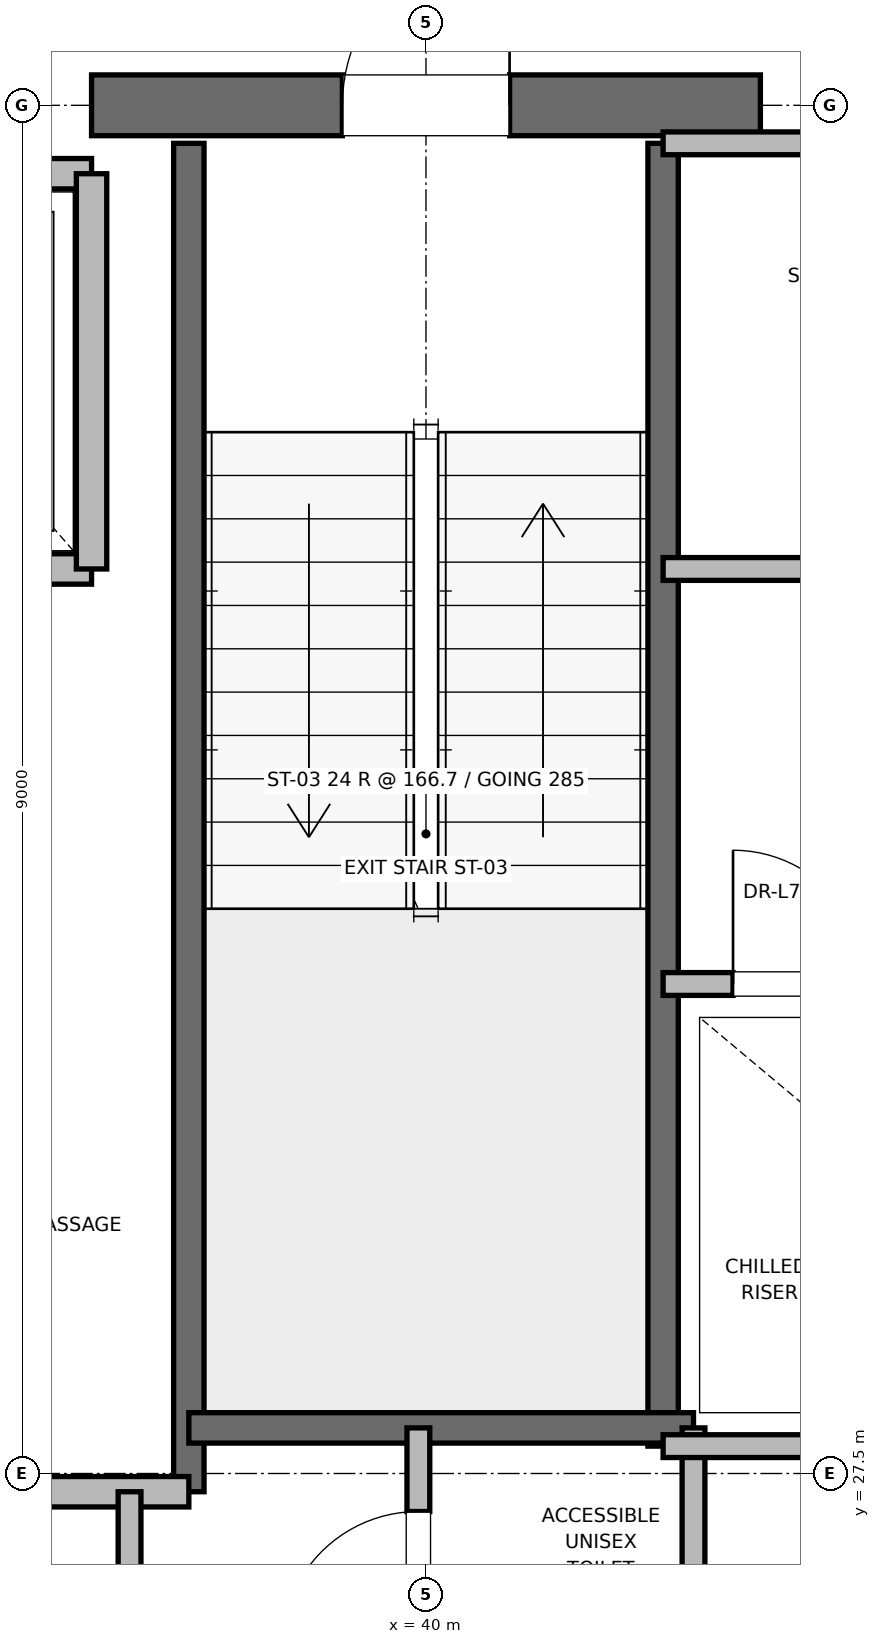
"""IFC4 building model, lengths in metres.
Left out: names, types, materials, properties, quantities, classifications, styles, units other than length and angle.
Written with IfcOpenShell. Run it as: python <this file> out.ifc"""

import sys

from ifc_helpers import new_model, si_unit, direction, frame, frame_2d, origin, place, context, subcontext, project, spatial, rectangle, extrude, element, fill, save


model = new_model("IFC4")
c1 = context("Model", 3, precision=1e-05, world=origin(), true_north=direction((0.0, 1.0)))
c2 = subcontext(c1, "Body", "Model", "MODEL_VIEW")
j1 = project(units=[si_unit("LENGTHUNIT", "METRE"), si_unit("PLANEANGLEUNIT", "RADIAN")], contexts=[c1])
p1 = place(None, origin())
s1 = spatial("IfcSite", under=j1, at=p1, CompositionType="ELEMENT")
p2 = place(p1, origin())
s2 = spatial("IfcBuilding", under=s1, at=p2, CompositionType="ELEMENT")
p3 = place(p2, frame((0.0, 0.0, 314.8)))
s3 = spatial("IfcBuildingStorey", under=s2, at=p3, CompositionType="ELEMENT", Elevation=314.8)
p4 = place(p3, frame((37.8, 36.5, 0.0), z_axis=(0.0, 0.0, 1.0), x_axis=(1.0, 0.0, 0.0)))
e1 = element("IfcWall", 1, at=p4, inside=s3, PredefinedType="SHEAR", context=c2, shape_type="SweptSolid", body=[
    extrude(rectangle(XDim=4.4, YDim=0.4, at=frame_2d((2.2, 0.0))), origin(), (0.0, 0.0, 1.0), 3.785),
])
p5 = place(p4, frame((1.65, 0.0, 0.0)))
e2 = element("IfcOpeningElement", 2, at=p5, cuts=e1, PredefinedType="OPENING", context=c2, shape_type="SweptSolid", body=[
    extrude(rectangle(XDim=1.1, YDim=2.15, at=frame_2d((0.55, 1.075))), frame((0.0, 0.2, 0.0), z_axis=(0.0, -1.0, 0.0), x_axis=(1.0, 0.0, 0.0)), (0.0, 0.0, 1.0), 0.4),
])
p6 = place(p3, frame((38.44, 27.38, 0.0), z_axis=(0.0, 0.0, 1.0), x_axis=(0.0, 1.0, 0.0)))
e3 = element("IfcWall", 3, at=p6, inside=s3, PredefinedType="SOLIDWALL", context=c2, shape_type="SweptSolid", body=[
    extrude(rectangle(XDim=8.87, YDim=0.2, at=frame_2d((4.435, 0.0))), origin(), (0.0, 0.0, 1.0), 3.785),
])
p7 = place(p3, frame((41.56, 27.68, 0.0), z_axis=(0.0, 0.0, 1.0), x_axis=(0.0, 1.0, 0.0)))
e4 = element("IfcWall", 4, at=p7, inside=s3, PredefinedType="SOLIDWALL", context=c2, shape_type="SweptSolid", body=[
    extrude(rectangle(XDim=8.57, YDim=0.2, at=frame_2d((4.285, 0.0))), origin(), (0.0, 0.0, 1.0), 3.785),
])
p8 = place(p3, frame((38.44, 27.8, 0.0), z_axis=(0.0, 0.0, 1.0), x_axis=(1.0, 0.0, 0.0)))
e5 = element("IfcWall", 5, at=p8, inside=s3, PredefinedType="SOLIDWALL", context=c2, shape_type="SweptSolid", body=[
    extrude(rectangle(XDim=3.32, YDim=0.2, at=frame_2d((1.66, 0.0))), origin(), (0.0, 0.0, 1.0), 3.785),
])
p9 = place(p3, frame((32.82, 27.38, 0.0), z_axis=(0.0, 0.0, 1.0), x_axis=(1.0, 0.0, 0.0)))
e6 = element("IfcWall", 6, at=p9, inside=s3, PredefinedType="PARTITIONING", context=c2, shape_type="SweptSolid", body=[
    extrude(rectangle(XDim=5.62, YDim=0.2, at=frame_2d((2.81, 0.0))), origin(), (0.0, 0.0, 1.0), 3.785),
])
p10 = place(p3, frame((35.5, 33.45, 0.0), z_axis=(0.0, 0.0, 1.0), x_axis=(1.0, 0.0, 0.0)))
e7 = element("IfcWall", 7, at=p10, inside=s3, PredefinedType="SOLIDWALL", context=c2, shape_type="SweptSolid", body=[
    extrude(rectangle(XDim=2.3, YDim=0.2, at=frame_2d((1.15, 0.0))), origin(), (0.0, 0.0, 1.0), 3.785),
])
p11 = place(p10, frame((0.6, 0.0, 0.0)))
e8 = element("IfcOpeningElement", 8, at=p11, cuts=e7, PredefinedType="OPENING", context=c2, shape_type="SweptSolid", body=[
    extrude(rectangle(XDim=1.1, YDim=2.2, at=frame_2d((0.55, 1.1))), frame((0.0, 0.1, 0.0), z_axis=(0.0, -1.0, 0.0), x_axis=(1.0, 0.0, 0.0)), (0.0, 0.0, 1.0), 0.2),
])
p12 = place(p3, frame((37.8, 36.05, 0.0), z_axis=(0.0, 0.0, 1.0), x_axis=(-1.0, 0.0, 0.0)))
e9 = element("IfcWall", 9, at=p12, inside=s3, PredefinedType="SOLIDWALL", context=c2, shape_type="SweptSolid", body=[
    extrude(rectangle(XDim=2.3, YDim=0.2, at=frame_2d((1.15, 0.0))), origin(), (0.0, 0.0, 1.0), 2.865),
])
p13 = place(p3, frame((37.8, 33.45, 0.0), z_axis=(0.0, 0.0, 1.0), x_axis=(0.0, 1.0, 0.0)))
e10 = element("IfcWall", 10, at=p13, inside=s3, PredefinedType="SOLIDWALL", context=c2, shape_type="SweptSolid", body=[
    extrude(rectangle(XDim=2.6, YDim=0.2, at=frame_2d((1.3, 0.0))), origin(), (0.0, 0.0, 1.0), 2.865),
])
p14 = place(p3, frame((41.76, 23.8, 0.0), z_axis=(0.0, 0.0, 1.0), x_axis=(0.0, 1.0, 0.0)))
e11 = element("IfcWall", 11, at=p14, inside=s3, PredefinedType="PARTITIONING", context=c2, shape_type="SweptSolid", body=[
    extrude(rectangle(XDim=4.0, YDim=0.15, at=frame_2d((2.0, 0.0))), origin(), (0.0, 0.0, 1.0), 2.85),
])
p15 = place(p3, frame((39.95, 25.8, 0.0), z_axis=(0.0, 0.0, 1.0), x_axis=(0.0, 1.0, 0.0)))
e12 = element("IfcWall", 12, at=p15, inside=s3, PredefinedType="PARTITIONING", context=c2, shape_type="SweptSolid", body=[
    extrude(rectangle(XDim=2.0, YDim=0.15, at=frame_2d((1.0, 0.0))), origin(), (0.0, 0.0, 1.0), 2.85),
])
p16 = place(p15, frame((0.55, 0.0, 0.0)))
e13 = element("IfcOpeningElement", 13, at=p16, cuts=e12, PredefinedType="OPENING", context=c2, shape_type="SweptSolid", body=[
    extrude(rectangle(XDim=0.9, YDim=2.1, at=frame_2d((0.45, 1.05))), frame((0.0, 0.075, 0.0), z_axis=(0.0, -1.0, 0.0), x_axis=(1.0, 0.0, 0.0)), (0.0, 0.0, 1.0), 0.15),
])
p17 = place(p3, frame((38.05, 23.06, 0.0), z_axis=(0.0, 0.0, 1.0), x_axis=(0.0, 1.0, 0.0)))
e14 = element("IfcWall", 14, at=p17, inside=s3, PredefinedType="PARTITIONING", context=c2, shape_type="SweptSolid", body=[
    extrude(rectangle(XDim=4.32, YDim=0.15, at=frame_2d((2.16, 0.0))), origin(), (0.0, 0.0, 1.0), 2.85),
])
p18 = place(p17, frame((1.66, 0.0, 0.0)))
e15 = element("IfcOpeningElement", 15, at=p18, cuts=e14, PredefinedType="OPENING", context=c2, shape_type="SweptSolid", body=[
    extrude(rectangle(XDim=1.0, YDim=2.15, at=frame_2d((0.5, 1.075))), frame((0.0, 0.075, 0.0), z_axis=(0.0, -1.0, 0.0), x_axis=(1.0, 0.0, 0.0)), (0.0, 0.0, 1.0), 0.15),
])
p19 = place(p3, frame((41.56, 27.68, 0.0), z_axis=(0.0, 0.0, 1.0), x_axis=(1.0, 0.0, 0.0)))
e16 = element("IfcWall", 16, at=p19, inside=s3, PredefinedType="PARTITIONING", context=c2, shape_type="SweptSolid", body=[
    extrude(rectangle(XDim=3.59, YDim=0.15, at=frame_2d((1.795, 0.0))), origin(), (0.0, 0.0, 1.0), 2.85),
])
p20 = place(p3, frame((41.56, 30.72, 0.0), z_axis=(0.0, 0.0, 1.0), x_axis=(1.0, 0.0, 0.0)))
e17 = element("IfcWall", 17, at=p20, inside=s3, PredefinedType="PARTITIONING", context=c2, shape_type="SweptSolid", body=[
    extrude(rectangle(XDim=1.8, YDim=0.15, at=frame_2d((0.9, 0.0))), origin(), (0.0, 0.0, 1.0), 2.85),
])
p21 = place(p20, frame((0.46, 0.0, 0.0)))
e18 = element("IfcOpeningElement", 18, at=p21, cuts=e17, PredefinedType="OPENING", context=c2, shape_type="SweptSolid", body=[
    extrude(rectangle(XDim=0.88, YDim=2.1, at=frame_2d((0.44, 1.05))), frame((0.0, 0.075, 0.0), z_axis=(0.0, -1.0, 0.0), x_axis=(1.0, 0.0, 0.0)), (0.0, 0.0, 1.0), 0.15),
])
p22 = place(p3, frame((41.56, 36.25, 0.0), z_axis=(0.0, 0.0, 1.0), x_axis=(1.0, 0.0, 0.0)))
e19 = element("IfcWall", 19, at=p22, inside=s3, PredefinedType="PARTITIONING", context=c2, shape_type="SweptSolid", body=[
    extrude(rectangle(XDim=2.94, YDim=0.15, at=frame_2d((1.47, 0.0))), origin(), (0.0, 0.0, 1.0), 2.85),
])
p23 = place(p3, frame((41.56, 33.45, 0.0), z_axis=(0.0, 0.0, 1.0), x_axis=(1.0, 0.0, 0.0)))
e20 = element("IfcWall", 20, at=p23, inside=s3, PredefinedType="PARTITIONING", context=c2, shape_type="SweptSolid", body=[
    extrude(rectangle(XDim=2.94, YDim=0.15, at=frame_2d((1.47, 0.0))), origin(), (0.0, 0.0, 1.0), 2.85),
])
p24 = place(p23, frame((1.03, 0.0, 0.0)))
e21 = element("IfcOpeningElement", 21, at=p24, cuts=e20, PredefinedType="OPENING", context=c2, shape_type="SweptSolid", body=[
    extrude(rectangle(XDim=0.88, YDim=2.1, at=frame_2d((0.44, 1.05))), frame((0.0, 0.075, 0.0), z_axis=(0.0, -1.0, 0.0), x_axis=(1.0, 0.0, 0.0)), (0.0, 0.0, 1.0), 0.15),
])
p25 = place(p5, origin())
e22 = element("IfcDoor", 22, at=p25, inside=s3, OperationType="SINGLE_SWING_RIGHT", PredefinedType="DOOR", context=c2, shape_type="SweptSolid", body=[
    extrude(rectangle(XDim=1.1, YDim=2.15, at=frame_2d((0.55, 1.075))), frame((0.0, 0.025, 0.0), z_axis=(0.0, -1.0, 0.0), x_axis=(1.0, 0.0, 0.0)), (0.0, 0.0, 1.0), 0.05),
])
fill(e2, e22)
p26 = place(p16, origin())
e23 = element("IfcDoor", 23, at=p26, inside=s3, OperationType="SINGLE_SWING_LEFT", PredefinedType="DOOR", context=c2, shape_type="SweptSolid", body=[
    extrude(rectangle(XDim=0.9, YDim=2.1, at=frame_2d((0.45, 1.05))), frame((0.0, 0.025, 0.0), z_axis=(0.0, -1.0, 0.0), x_axis=(1.0, 0.0, 0.0)), (0.0, 0.0, 1.0), 0.05),
])
fill(e13, e23)
p27 = place(p21, origin())
e24 = element("IfcDoor", 24, at=p27, inside=s3, OperationType="SINGLE_SWING_LEFT", PredefinedType="DOOR", context=c2, shape_type="SweptSolid", body=[
    extrude(rectangle(XDim=0.88, YDim=2.1, at=frame_2d((0.44, 1.05))), frame((0.0, 0.025, 0.0), z_axis=(0.0, -1.0, 0.0), x_axis=(1.0, 0.0, 0.0)), (0.0, 0.0, 1.0), 0.05),
])
fill(e18, e24)
save(model, sys.argv[1])
